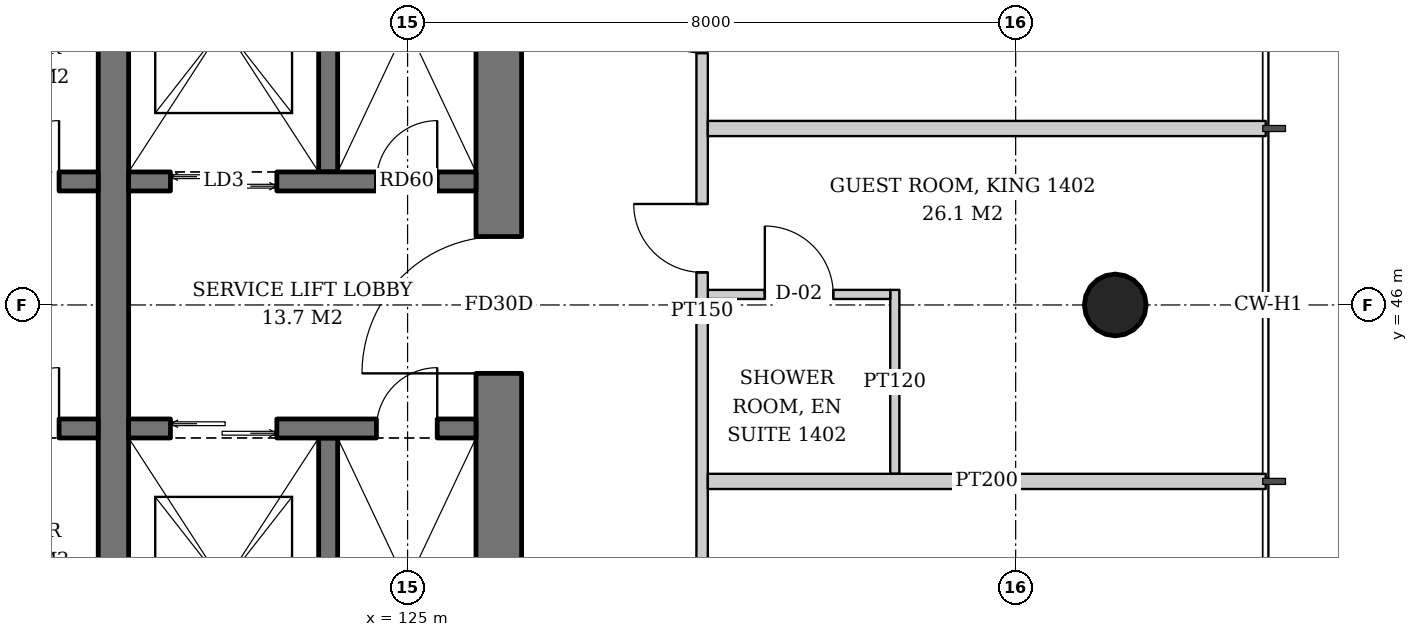
"""IFC4 building model, lengths in metres.
Left out: names, types, materials, properties, quantities, classifications, styles, units other than length and angle.
Written with IfcOpenShell. Run it as: python <this file> out.ifc"""

import sys

from ifc_helpers import new_model, si_unit, direction, frame, frame_2d, origin, origin_2d, place, context, subcontext, project, spatial, rectangle, hollow_circle, extrude, element, fill, save


model = new_model("IFC4")
c1 = context("Model", 3, precision=1e-05, world=origin(), true_north=direction((0.0, 1.0)))
c2 = subcontext(c1, "Body", "Model", "MODEL_VIEW")
j1 = project(units=[si_unit("LENGTHUNIT", "METRE"), si_unit("PLANEANGLEUNIT", "RADIAN")], contexts=[c1])
p1 = place(None, origin())
s1 = spatial("IfcSite", under=j1, at=p1, CompositionType="ELEMENT")
p2 = place(p1, origin())
s2 = spatial("IfcBuilding", under=s1, at=p2, CompositionType="ELEMENT")
p3 = place(p2, frame((0.0, 0.0, 59.0)))
s3 = spatial("IfcBuildingStorey", under=s2, at=p3, CompositionType="ELEMENT", Elevation=59.0)
p4 = place(p3, frame((134.362, 46.0, 0.0), z_axis=(-0.043069538298, 0.0, 0.999072076915), x_axis=(0.0, -1.0, 0.0)))
e1 = element("IfcColumn", 1, at=p4, inside=s3, PredefinedType="COLUMN", context=c2, shape_type="SweptSolid", body=[
    extrude(hollow_circle(Radius=0.406, WallThickness=0.03, at=origin_2d()), origin(), (0.0, 0.0, 1.0), 3.803),
])
p5 = place(p3, frame((126.2, 37.1, 0.0), z_axis=(0.0, 0.0, 1.0), x_axis=(0.0, 1.0, 0.0)))
e2 = element("IfcWall", 2, at=p5, inside=s3, PredefinedType="SHEAR", context=c2, shape_type="SweptSolid", body=[
    extrude(rectangle(XDim=17.8, YDim=0.6, at=frame_2d((8.9, 0.0))), origin(), (0.0, 0.0, 1.0), 3.8),
])
p6 = place(p5, frame((8.0, 0.0, 0.0)))
e3 = element("IfcOpeningElement", 3, at=p6, cuts=e2, PredefinedType="OPENING", context=c2, shape_type="SweptSolid", body=[
    extrude(rectangle(XDim=1.8, YDim=2.4, at=frame_2d((0.9, 1.2))), frame((0.0, 0.31, 0.0), z_axis=(0.0, -1.0, 0.0), x_axis=(1.0, 0.0, 0.0)), (0.0, 0.0, 1.0), 0.62),
])
p7 = place(p3, frame((121.13, 40.4, 0.0), z_axis=(0.0, 0.0, 1.0), x_axis=(0.0, 1.0, 0.0)))
e4 = element("IfcWall", 4, at=p7, inside=s3, PredefinedType="SHEAR", context=c2, shape_type="SweptSolid", body=[
    extrude(rectangle(XDim=11.2, YDim=0.4, at=frame_2d((5.6, 0.0))), origin(), (0.0, 0.0, 1.0), 3.8),
])
p8 = place(p3, frame((108.1, 47.625, 0.0), z_axis=(0.0, 0.0, 1.0), x_axis=(1.0, 0.0, 0.0)))
e5 = element("IfcWall", 5, at=p8, inside=s3, PredefinedType="SHEAR", context=c2, shape_type="SweptSolid", body=[
    extrude(rectangle(XDim=12.83, YDim=0.25, at=frame_2d((6.415, 0.0))), origin(), (0.0, 0.0, 1.0), 3.8),
])
p9 = place(p8, frame((0.7, 0.0, 0.0)))
e6 = element("IfcOpeningElement", 6, at=p9, cuts=e5, PredefinedType="OPENING", context=c2, shape_type="SweptSolid", body=[
    extrude(rectangle(XDim=1.1, YDim=2.2, at=frame_2d((0.55, 1.1))), frame((0.0, 0.135, 0.0), z_axis=(0.0, -1.0, 0.0), x_axis=(1.0, 0.0, 0.0)), (0.0, 0.0, 1.0), 0.27),
])
p10 = place(p8, frame((3.45, 0.0, 0.0)))
e7 = element("IfcOpeningElement", 7, at=p10, cuts=e5, PredefinedType="OPENING", context=c2, shape_type="SweptSolid", body=[
    extrude(rectangle(XDim=1.1, YDim=2.2, at=frame_2d((0.55, 1.1))), frame((0.0, 0.135, 0.0), z_axis=(0.0, -1.0, 0.0), x_axis=(1.0, 0.0, 0.0)), (0.0, 0.0, 1.0), 0.27),
])
p11 = place(p8, frame((6.2, 0.0, 0.0)))
e8 = element("IfcOpeningElement", 8, at=p11, cuts=e5, PredefinedType="OPENING", context=c2, shape_type="SweptSolid", body=[
    extrude(rectangle(XDim=1.1, YDim=2.2, at=frame_2d((0.55, 1.1))), frame((0.0, 0.135, 0.0), z_axis=(0.0, -1.0, 0.0), x_axis=(1.0, 0.0, 0.0)), (0.0, 0.0, 1.0), 0.27),
])
p12 = place(p8, frame((8.95, 0.0, 0.0)))
e9 = element("IfcOpeningElement", 9, at=p12, cuts=e5, PredefinedType="OPENING", context=c2, shape_type="SweptSolid", body=[
    extrude(rectangle(XDim=1.1, YDim=2.2, at=frame_2d((0.55, 1.1))), frame((0.0, 0.135, 0.0), z_axis=(0.0, -1.0, 0.0), x_axis=(1.0, 0.0, 0.0)), (0.0, 0.0, 1.0), 0.27),
])
p13 = place(p8, frame((11.515, 0.0, 0.0)))
e10 = element("IfcOpeningElement", 10, at=p13, cuts=e5, PredefinedType="OPENING", context=c2, shape_type="SweptSolid", body=[
    extrude(rectangle(XDim=0.8, YDim=2.0, at=frame_2d((0.4, 1.0))), frame((0.0, 0.135, 0.0), z_axis=(0.0, -1.0, 0.0), x_axis=(1.0, 0.0, 0.0)), (0.0, 0.0, 1.0), 0.27),
])
p14 = place(p3, frame((108.1, 44.375, 0.0), z_axis=(0.0, 0.0, 1.0), x_axis=(1.0, 0.0, 0.0)))
e11 = element("IfcWall", 11, at=p14, inside=s3, PredefinedType="SHEAR", context=c2, shape_type="SweptSolid", body=[
    extrude(rectangle(XDim=12.83, YDim=0.25, at=frame_2d((6.415, 0.0))), origin(), (0.0, 0.0, 1.0), 3.8),
])
p15 = place(p14, frame((0.7, 0.0, 0.0)))
e12 = element("IfcOpeningElement", 12, at=p15, cuts=e11, PredefinedType="OPENING", context=c2, shape_type="SweptSolid", body=[
    extrude(rectangle(XDim=1.1, YDim=2.2, at=frame_2d((0.55, 1.1))), frame((0.0, 0.135, 0.0), z_axis=(0.0, -1.0, 0.0), x_axis=(1.0, 0.0, 0.0)), (0.0, 0.0, 1.0), 0.27),
])
p16 = place(p14, frame((3.45, 0.0, 0.0)))
e13 = element("IfcOpeningElement", 13, at=p16, cuts=e11, PredefinedType="OPENING", context=c2, shape_type="SweptSolid", body=[
    extrude(rectangle(XDim=1.1, YDim=2.2, at=frame_2d((0.55, 1.1))), frame((0.0, 0.135, 0.0), z_axis=(0.0, -1.0, 0.0), x_axis=(1.0, 0.0, 0.0)), (0.0, 0.0, 1.0), 0.27),
])
p17 = place(p14, frame((6.2, 0.0, 0.0)))
e14 = element("IfcOpeningElement", 14, at=p17, cuts=e11, PredefinedType="OPENING", context=c2, shape_type="SweptSolid", body=[
    extrude(rectangle(XDim=1.1, YDim=2.2, at=frame_2d((0.55, 1.1))), frame((0.0, 0.135, 0.0), z_axis=(0.0, -1.0, 0.0), x_axis=(1.0, 0.0, 0.0)), (0.0, 0.0, 1.0), 0.27),
])
p18 = place(p14, frame((9.0, 0.0, 0.0)))
e15 = element("IfcOpeningElement", 15, at=p18, cuts=e11, PredefinedType="OPENING", context=c2, shape_type="SweptSolid", body=[
    extrude(rectangle(XDim=1.0, YDim=2.1, at=frame_2d((0.5, 1.05))), frame((0.0, 0.135, 0.0), z_axis=(0.0, -1.0, 0.0), x_axis=(1.0, 0.0, 0.0)), (0.0, 0.0, 1.0), 0.27),
])
p19 = place(p14, frame((11.515, 0.0, 0.0)))
e16 = element("IfcOpeningElement", 16, at=p19, cuts=e11, PredefinedType="OPENING", context=c2, shape_type="SweptSolid", body=[
    extrude(rectangle(XDim=0.8, YDim=2.0, at=frame_2d((0.4, 1.0))), frame((0.0, 0.135, 0.0), z_axis=(0.0, -1.0, 0.0), x_axis=(1.0, 0.0, 0.0)), (0.0, 0.0, 1.0), 0.27),
])
p20 = place(p3, frame((123.955, 47.75, 0.0), z_axis=(0.0, 0.0, 1.0), x_axis=(0.0, 1.0, 0.0)))
e17 = element("IfcWall", 17, at=p20, inside=s3, PredefinedType="SHEAR", context=c2, shape_type="SweptSolid", body=[
    extrude(rectangle(XDim=3.85, YDim=0.25, at=frame_2d((1.925, 0.0))), origin(), (0.0, 0.0, 1.0), 3.8),
])
p21 = place(p3, frame((121.33, 47.625, 0.0), z_axis=(0.0, 0.0, 1.0), x_axis=(1.0, 0.0, 0.0)))
e18 = element("IfcWall", 18, at=p21, inside=s3, PredefinedType="SHEAR", context=c2, shape_type="SweptSolid", body=[
    extrude(rectangle(XDim=4.57, YDim=0.25, at=frame_2d((2.285, 0.0))), origin(), (0.0, 0.0, 1.0), 3.8),
])
p22 = place(p21, frame((0.55, 0.0, 0.0)))
e19 = element("IfcOpeningElement", 19, at=p22, cuts=e18, PredefinedType="OPENING", context=c2, shape_type="SweptSolid", body=[
    extrude(rectangle(XDim=1.4, YDim=2.4, at=frame_2d((0.7, 1.2))), frame((0.0, 0.135, 0.0), z_axis=(0.0, -1.0, 0.0), x_axis=(1.0, 0.0, 0.0)), (0.0, 0.0, 1.0), 0.27),
])
p23 = place(p21, frame((3.26, 0.0, 0.0)))
e20 = element("IfcOpeningElement", 20, at=p23, cuts=e18, PredefinedType="OPENING", context=c2, shape_type="SweptSolid", body=[
    extrude(rectangle(XDim=0.8, YDim=2.0, at=frame_2d((0.4, 1.0))), frame((0.0, 0.135, 0.0), z_axis=(0.0, -1.0, 0.0), x_axis=(1.0, 0.0, 0.0)), (0.0, 0.0, 1.0), 0.27),
])
p24 = place(p3, frame((123.955, 44.25, 0.0), z_axis=(0.0, 0.0, 1.0), x_axis=(0.0, -1.0, 0.0)))
e21 = element("IfcWall", 21, at=p24, inside=s3, PredefinedType="SHEAR", context=c2, shape_type="SweptSolid", body=[
    extrude(rectangle(XDim=3.85, YDim=0.25, at=frame_2d((1.925, 0.0))), origin(), (0.0, 0.0, 1.0), 3.8),
])
p25 = place(p3, frame((121.33, 44.375, 0.0), z_axis=(0.0, 0.0, 1.0), x_axis=(1.0, 0.0, 0.0)))
e22 = element("IfcWall", 22, at=p25, inside=s3, PredefinedType="SHEAR", context=c2, shape_type="SweptSolid", body=[
    extrude(rectangle(XDim=4.57, YDim=0.25, at=frame_2d((2.285, 0.0))), origin(), (0.0, 0.0, 1.0), 3.8),
])
p26 = place(p25, frame((0.55, 0.0, 0.0)))
e23 = element("IfcOpeningElement", 23, at=p26, cuts=e22, PredefinedType="OPENING", context=c2, shape_type="SweptSolid", body=[
    extrude(rectangle(XDim=1.4, YDim=2.4, at=frame_2d((0.7, 1.2))), frame((0.0, 0.135, 0.0), z_axis=(0.0, -1.0, 0.0), x_axis=(1.0, 0.0, 0.0)), (0.0, 0.0, 1.0), 0.27),
])
p27 = place(p25, frame((3.26, 0.0, 0.0)))
e24 = element("IfcOpeningElement", 24, at=p27, cuts=e22, PredefinedType="OPENING", context=c2, shape_type="SweptSolid", body=[
    extrude(rectangle(XDim=0.8, YDim=2.0, at=frame_2d((0.4, 1.0))), frame((0.0, 0.135, 0.0), z_axis=(0.0, -1.0, 0.0), x_axis=(1.0, 0.0, 0.0)), (0.0, 0.0, 1.0), 0.27),
])
p28 = place(p3, frame((131.41, 43.779, 0.0), z_axis=(0.0, 0.0, 1.0), x_axis=(0.0, 1.0, 0.0)))
e25 = element("IfcWall", 25, at=p28, inside=s3, PredefinedType="PARTITIONING", context=c2, shape_type="SweptSolid", body=[
    extrude(rectangle(XDim=2.42, YDim=0.12, at=frame_2d((1.21, 0.0))), origin(), (0.0, 0.0, 1.0), 2.847),
])
p29 = place(p3, frame((128.95, 46.139, 0.0), z_axis=(0.0, 0.0, 1.0), x_axis=(1.0, 0.0, 0.0)))
e26 = element("IfcWall", 26, at=p29, inside=s3, PredefinedType="PARTITIONING", context=c2, shape_type="SweptSolid", body=[
    extrude(rectangle(XDim=2.4, YDim=0.12, at=frame_2d((1.2, 0.0))), origin(), (0.0, 0.0, 1.0), 3.6),
])
p30 = place(p29, frame((0.75, 0.0, 0.0)))
e27 = element("IfcOpeningElement", 27, at=p30, cuts=e26, PredefinedType="OPENING", context=c2, shape_type="SweptSolid", body=[
    extrude(rectangle(XDim=0.9, YDim=2.1, at=frame_2d((0.45, 1.05))), frame((0.0, 0.07, 0.0), z_axis=(0.0, -1.0, 0.0), x_axis=(1.0, 0.0, 0.0)), (0.0, 0.0, 1.0), 0.14),
])
p31 = place(p3, frame((128.875, 34.05, 0.0), z_axis=(0.0, 0.0, 1.0), x_axis=(0.0, 1.0, 0.0)))
e28 = element("IfcWall", 28, at=p31, inside=s3, PredefinedType="PARTITIONING", context=c2, shape_type="SweptSolid", body=[
    extrude(rectangle(XDim=23.75, YDim=0.15, at=frame_2d((11.875, 0.0))), origin(), (0.0, 0.0, 1.0), 2.8),
])
p32 = place(p31, frame((2.068, 0.0, 0.0)))
e29 = element("IfcOpeningElement", 29, at=p32, cuts=e28, PredefinedType="OPENING", context=c2, shape_type="SweptSolid", body=[
    extrude(rectangle(XDim=0.9, YDim=2.1, at=frame_2d((0.45, 1.05))), frame((0.0, 0.085, 0.0), z_axis=(0.0, -1.0, 0.0), x_axis=(1.0, 0.0, 0.0)), (0.0, 0.0, 1.0), 0.17),
])
p33 = place(p31, frame((12.379, 0.0, 0.0)))
e30 = element("IfcOpeningElement", 30, at=p33, cuts=e28, PredefinedType="OPENING", context=c2, shape_type="SweptSolid", body=[
    extrude(rectangle(XDim=0.9, YDim=2.1, at=frame_2d((0.45, 1.05))), frame((0.0, 0.085, 0.0), z_axis=(0.0, -1.0, 0.0), x_axis=(1.0, 0.0, 0.0)), (0.0, 0.0, 1.0), 0.17),
])
p34 = place(p31, frame((15.264, 0.0, 0.0)))
e31 = element("IfcOpeningElement", 31, at=p34, cuts=e28, PredefinedType="OPENING", context=c2, shape_type="SweptSolid", body=[
    extrude(rectangle(XDim=0.9, YDim=2.1, at=frame_2d((0.45, 1.05))), frame((0.0, 0.085, 0.0), z_axis=(0.0, -1.0, 0.0), x_axis=(1.0, 0.0, 0.0)), (0.0, 0.0, 1.0), 0.17),
])
for number, where, z_axis, x_axis in (
    (32, (128.95, 43.678, 0.0), (0.0, 0.0, 1.0), (1.0, 0.0, 0.0)),
    (33, (128.95, 48.322, 0.0), (0.0, 0.0, 1.0), (1.0, 0.0, 0.0)),
):
    element("IfcWall", number, at=place(p3, frame(where, z_axis=z_axis, x_axis=x_axis)), inside=s3, PredefinedType="PARTITIONING", context=c2, shape_type="SweptSolid", body=[
        extrude(rectangle(XDim=7.34, YDim=0.2, at=frame_2d((3.67, 0.0))), origin(), (0.0, 0.0, 1.0), 3.05),
    ])
p35 = place(p13, origin())
e34 = element("IfcDoor", 34, at=p35, inside=s3, OperationType="SINGLE_SWING_RIGHT", PredefinedType="DOOR", context=c2, shape_type="SweptSolid", body=[
    extrude(rectangle(XDim=0.8, YDim=2.0, at=frame_2d((0.4, 1.0))), frame((0.0, 0.025, 0.0), z_axis=(0.0, -1.0, 0.0), x_axis=(1.0, 0.0, 0.0)), (0.0, 0.0, 1.0), 0.05),
])
fill(e10, e34)
p36 = place(p19, origin())
e35 = element("IfcDoor", 35, at=p36, inside=s3, OperationType="SINGLE_SWING_RIGHT", PredefinedType="DOOR", context=c2, shape_type="SweptSolid", body=[
    extrude(rectangle(XDim=0.8, YDim=2.0, at=frame_2d((0.4, 1.0))), frame((0.0, 0.025, 0.0), z_axis=(0.0, -1.0, 0.0), x_axis=(1.0, 0.0, 0.0)), (0.0, 0.0, 1.0), 0.05),
])
fill(e16, e35)
p37 = place(p22, origin())
e36 = element("IfcDoor", 36, at=p37, inside=s3, OperationType="DOUBLE_DOOR_SLIDING", PredefinedType="DOOR", context=c2, shape_type="SweptSolid", body=[
    extrude(rectangle(XDim=1.4, YDim=2.4, at=frame_2d((0.7, 1.2))), frame((0.0, 0.025, 0.0), z_axis=(0.0, -1.0, 0.0), x_axis=(1.0, 0.0, 0.0)), (0.0, 0.0, 1.0), 0.05),
])
fill(e19, e36)
p38 = place(p23, origin())
e37 = element("IfcDoor", 37, at=p38, inside=s3, OperationType="SINGLE_SWING_RIGHT", PredefinedType="DOOR", context=c2, shape_type="SweptSolid", body=[
    extrude(rectangle(XDim=0.8, YDim=2.0, at=frame_2d((0.4, 1.0))), frame((0.0, 0.025, 0.0), z_axis=(0.0, -1.0, 0.0), x_axis=(1.0, 0.0, 0.0)), (0.0, 0.0, 1.0), 0.05),
])
fill(e20, e37)
p39 = place(p26, origin())
e38 = element("IfcDoor", 38, at=p39, inside=s3, OperationType="DOUBLE_DOOR_SLIDING", PredefinedType="DOOR", context=c2, shape_type="SweptSolid", body=[
    extrude(rectangle(XDim=1.4, YDim=2.4, at=frame_2d((0.7, 1.2))), frame((0.0, 0.025, 0.0), z_axis=(0.0, -1.0, 0.0), x_axis=(1.0, 0.0, 0.0)), (0.0, 0.0, 1.0), 0.05),
])
fill(e23, e38)
p40 = place(p27, origin())
e39 = element("IfcDoor", 39, at=p40, inside=s3, OperationType="SINGLE_SWING_RIGHT", PredefinedType="DOOR", context=c2, shape_type="SweptSolid", body=[
    extrude(rectangle(XDim=0.8, YDim=2.0, at=frame_2d((0.4, 1.0))), frame((0.0, 0.025, 0.0), z_axis=(0.0, -1.0, 0.0), x_axis=(1.0, 0.0, 0.0)), (0.0, 0.0, 1.0), 0.05),
])
fill(e24, e39)
p41 = place(p6, origin())
e40 = element("IfcDoor", 40, at=p41, inside=s3, OperationType="DOUBLE_DOOR_SINGLE_SWING", PredefinedType="DOOR", context=c2, shape_type="SweptSolid", body=[
    extrude(rectangle(XDim=1.8, YDim=2.4, at=frame_2d((0.9, 1.2))), frame((0.0, 0.025, 0.0), z_axis=(0.0, -1.0, 0.0), x_axis=(1.0, 0.0, 0.0)), (0.0, 0.0, 1.0), 0.05),
])
fill(e3, e40)
p42 = place(p30, origin())
e41 = element("IfcDoor", 41, at=p42, inside=s3, OperationType="SINGLE_SWING_LEFT", PredefinedType="DOOR", context=c2, shape_type="SweptSolid", body=[
    extrude(rectangle(XDim=0.9, YDim=2.1, at=frame_2d((0.45, 1.05))), frame((0.0, 0.025, 0.0), z_axis=(0.0, -1.0, 0.0), x_axis=(1.0, 0.0, 0.0)), (0.0, 0.0, 1.0), 0.05),
])
fill(e27, e41)
p43 = place(p33, origin())
e42 = element("IfcDoor", 42, at=p43, inside=s3, OperationType="SINGLE_SWING_RIGHT", PredefinedType="DOOR", context=c2, shape_type="SweptSolid", body=[
    extrude(rectangle(XDim=0.9, YDim=2.1, at=frame_2d((0.45, 1.05))), frame((0.0, 0.025, 0.0), z_axis=(0.0, -1.0, 0.0), x_axis=(1.0, 0.0, 0.0)), (0.0, 0.0, 1.0), 0.05),
])
fill(e30, e42)
p44 = place(p34, origin())
e43 = element("IfcDoor", 43, at=p44, inside=s3, OperationType="SINGLE_SWING_RIGHT", PredefinedType="DOOR", context=c2, shape_type="SweptSolid", body=[
    extrude(rectangle(XDim=0.9, YDim=2.1, at=frame_2d((0.45, 1.05))), frame((0.0, 0.025, 0.0), z_axis=(0.0, -1.0, 0.0), x_axis=(1.0, 0.0, 0.0)), (0.0, 0.0, 1.0), 0.05),
])
fill(e31, e43)
save(model, sys.argv[1])
